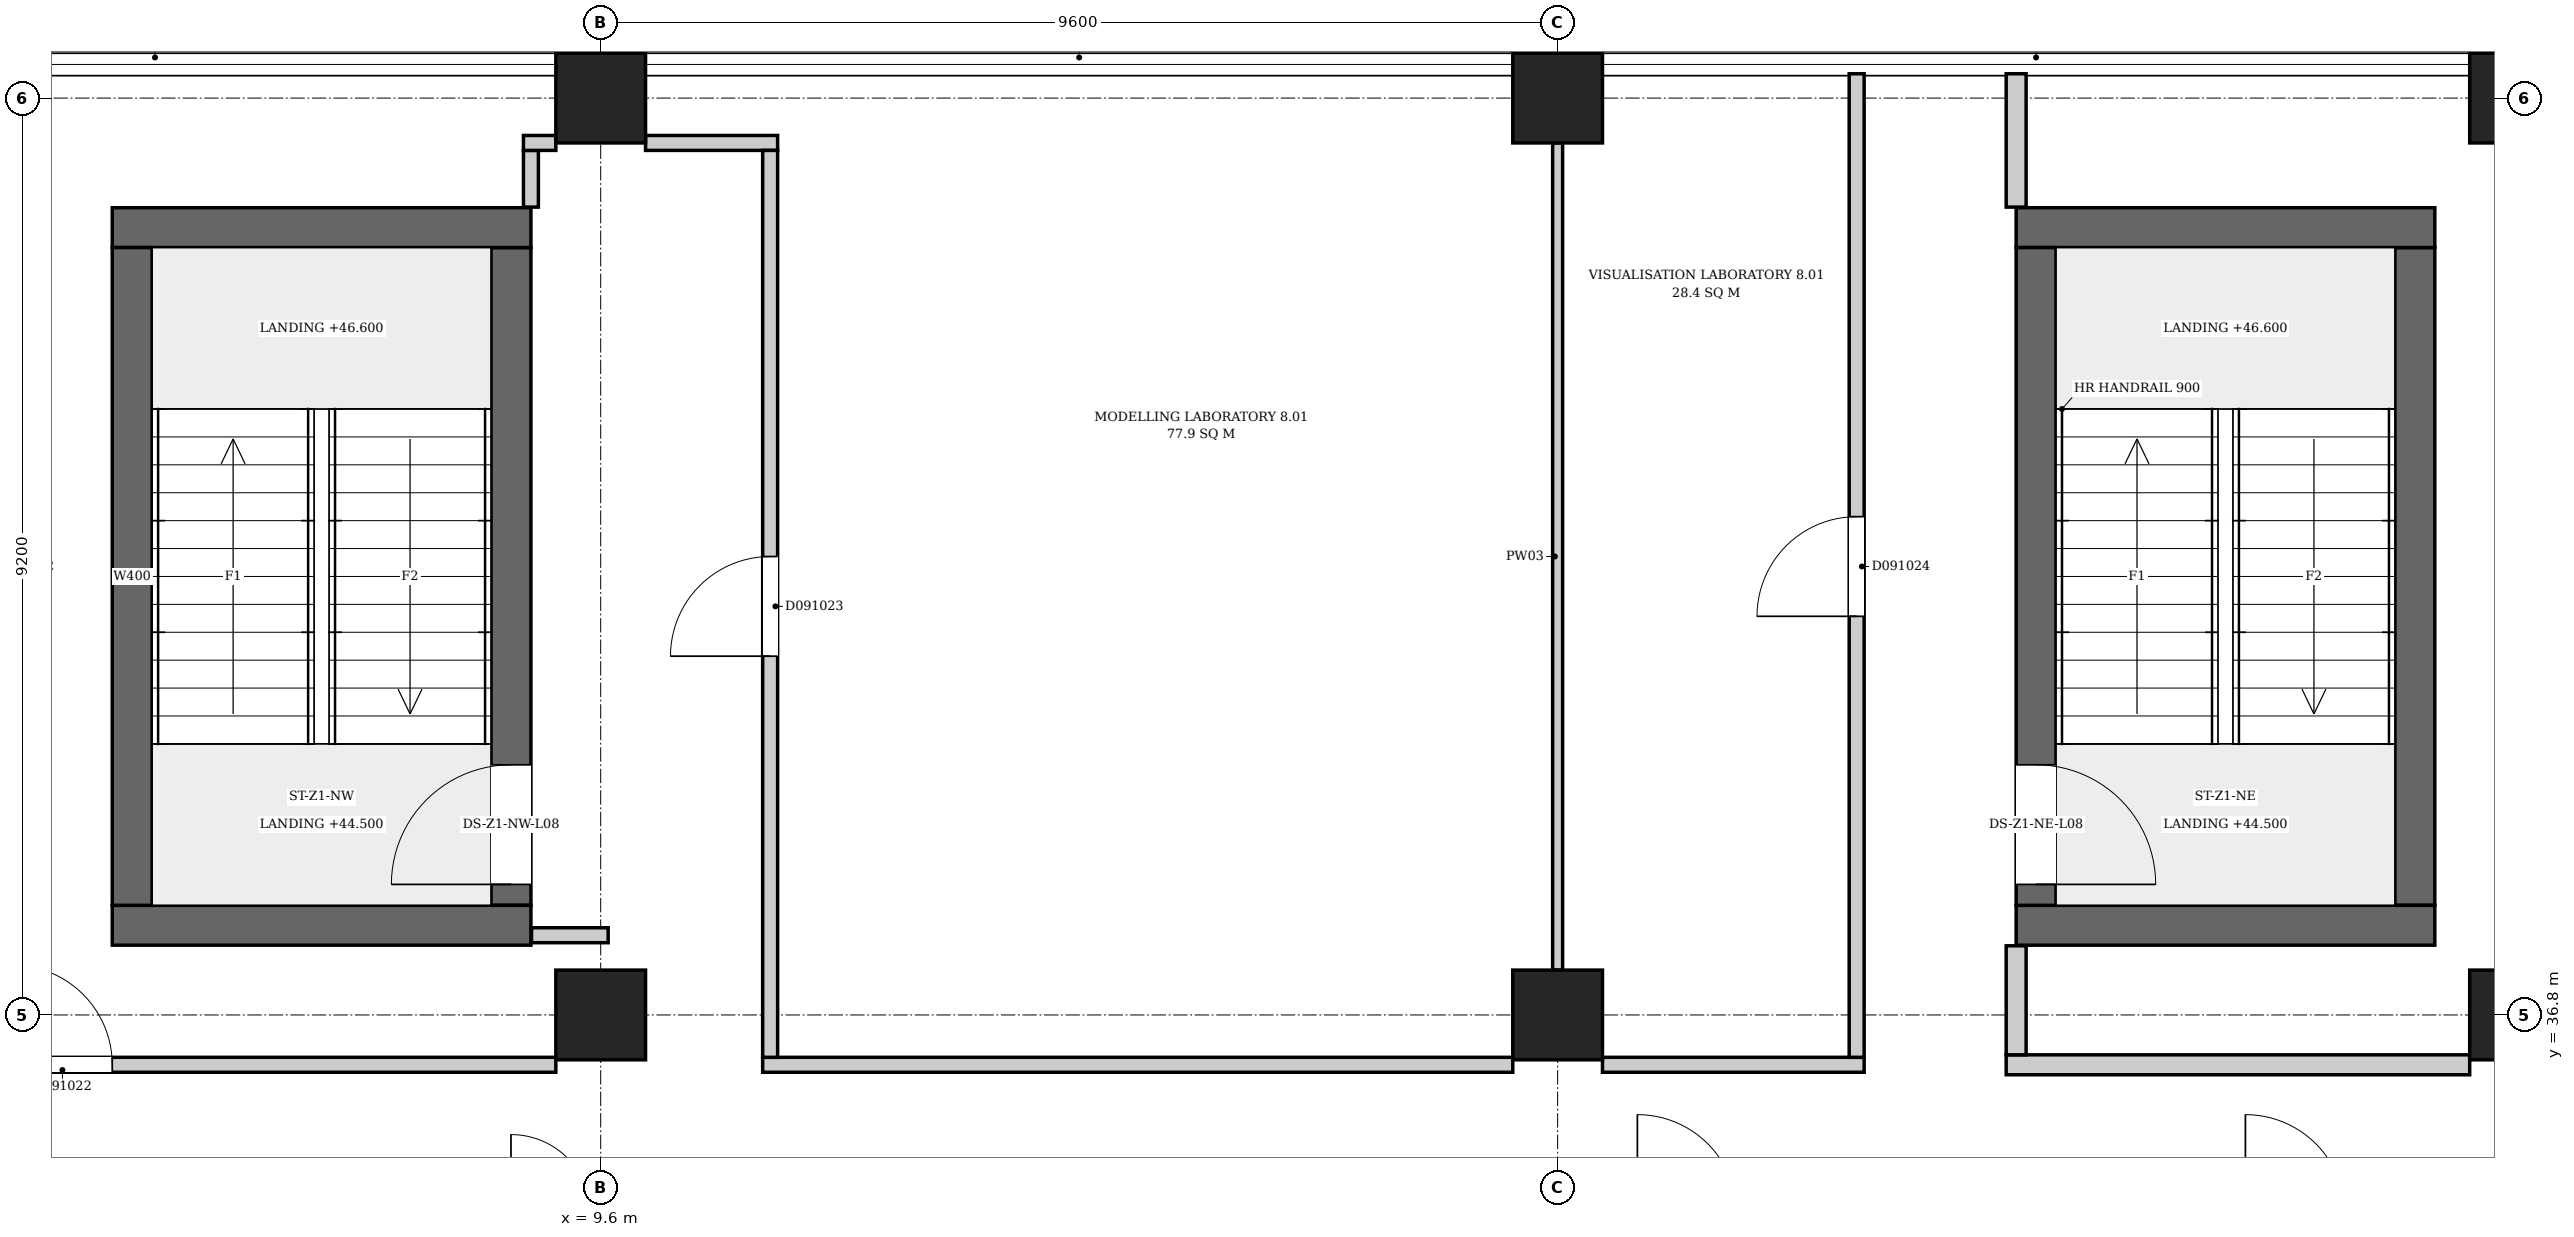
"""IFC4 building model, lengths in metres.
Left out: names, types, materials, properties, quantities, classifications, styles, units other than length and angle.
Written with IfcOpenShell. Run it as: python <this file> out.ifc"""

import sys

from ifc_helpers import new_model, si_unit, direction, frame, frame_2d, origin, origin_2d, place, context, subcontext, project, spatial, rectangle, extrude, element, fill, save


model = new_model("IFC4")
c1 = context("Model", 3, precision=1e-05, world=origin(), true_north=direction((0.0, 1.0)))
c2 = subcontext(c1, "Body", "Model", "MODEL_VIEW")
j1 = project(units=[si_unit("LENGTHUNIT", "METRE"), si_unit("PLANEANGLEUNIT", "RADIAN")], contexts=[c1])
p1 = place(None, origin())
s1 = spatial("IfcSite", under=j1, at=p1, CompositionType="ELEMENT")
p2 = place(p1, origin())
s2 = spatial("IfcBuilding", under=s1, at=p2, CompositionType="ELEMENT")
p3 = place(p2, frame((0.0, 0.0, 44.5)))
s3 = spatial("IfcBuildingStorey", under=s2, at=p3, CompositionType="ELEMENT", Elevation=44.5)
for number, where, z_axis, x_axis in (
    (1, (4.7, 37.7, 0.0), (0.0, 0.0, 1.0), (1.0, 0.0, 0.0)),
    (2, (4.7, 44.7, 0.0), (0.0, 0.0, 1.0), (1.0, 0.0, 0.0)),
):
    element("IfcWall", number, at=place(p3, frame(where, z_axis=z_axis, x_axis=x_axis)), inside=s3, PredefinedType="SHEAR", context=c2, shape_type="SweptSolid", body=[
        extrude(rectangle(XDim=4.2, YDim=0.4, at=frame_2d((2.1, 0.0))), origin(), (0.0, 0.0, 1.0), 4.2),
    ])
p4 = place(p3, frame((4.9, 37.9, 0.0), z_axis=(0.0, 0.0, 1.0), x_axis=(0.0, 1.0, 0.0)))
e3 = element("IfcWall", 3, at=p4, inside=s3, PredefinedType="SHEAR", context=c2, shape_type="SweptSolid", body=[
    extrude(rectangle(XDim=6.6, YDim=0.4, at=frame_2d((3.3, 0.0))), origin(), (0.0, 0.0, 1.0), 4.2),
])
p5 = place(p3, frame((8.7, 37.9, 0.0), z_axis=(0.0, 0.0, 1.0), x_axis=(0.0, 1.0, 0.0)))
e4 = element("IfcWall", 4, at=p5, inside=s3, PredefinedType="SHEAR", context=c2, shape_type="SweptSolid", body=[
    extrude(rectangle(XDim=6.6, YDim=0.4, at=frame_2d((3.3, 0.0))), origin(), (0.0, 0.0, 1.0), 4.2),
])
p6 = place(p5, frame((0.21, 0.0, 0.0)))
e5 = element("IfcOpeningElement", 5, at=p6, cuts=e4, PredefinedType="OPENING", context=c2, shape_type="SweptSolid", body=[
    extrude(rectangle(XDim=1.2, YDim=2.1, at=frame_2d((0.6, 1.05))), frame((0.0, 0.21, 0.0), z_axis=(0.0, -1.0, 0.0), x_axis=(1.0, 0.0, 0.0)), (0.0, 0.0, 1.0), 0.42),
])
for number, where, z_axis, x_axis in (
    (6, (23.8, 37.7, 0.0), (0.0, 0.0, 1.0), (1.0, 0.0, 0.0)),
    (7, (23.8, 44.7, 0.0), (0.0, 0.0, 1.0), (1.0, 0.0, 0.0)),
):
    element("IfcWall", number, at=place(p3, frame(where, z_axis=z_axis, x_axis=x_axis)), inside=s3, PredefinedType="SHEAR", context=c2, shape_type="SweptSolid", body=[
        extrude(rectangle(XDim=4.2, YDim=0.4, at=frame_2d((2.1, 0.0))), origin(), (0.0, 0.0, 1.0), 4.2),
    ])
p7 = place(p3, frame((24.0, 37.9, 0.0), z_axis=(0.0, 0.0, 1.0), x_axis=(0.0, 1.0, 0.0)))
e8 = element("IfcWall", 8, at=p7, inside=s3, PredefinedType="SHEAR", context=c2, shape_type="SweptSolid", body=[
    extrude(rectangle(XDim=6.6, YDim=0.4, at=frame_2d((3.3, 0.0))), origin(), (0.0, 0.0, 1.0), 4.2),
])
p8 = place(p7, frame((0.21, 0.0, 0.0)))
e9 = element("IfcOpeningElement", 9, at=p8, cuts=e8, PredefinedType="OPENING", context=c2, shape_type="SweptSolid", body=[
    extrude(rectangle(XDim=1.2, YDim=2.1, at=frame_2d((0.6, 1.05))), frame((0.0, 0.21, 0.0), z_axis=(0.0, -1.0, 0.0), x_axis=(1.0, 0.0, 0.0)), (0.0, 0.0, 1.0), 0.42),
])
p9 = place(p3, frame((27.8, 37.9, 0.0), z_axis=(0.0, 0.0, 1.0), x_axis=(0.0, 1.0, 0.0)))
e10 = element("IfcWall", 10, at=p9, inside=s3, PredefinedType="SHEAR", context=c2, shape_type="SweptSolid", body=[
    extrude(rectangle(XDim=6.6, YDim=0.4, at=frame_2d((3.3, 0.0))), origin(), (0.0, 0.0, 1.0), 4.2),
])
for number, where, z_axis, x_axis in (
    (11, (9.6, 36.8, 0.0), (0.0, 0.0, 1.0), (1.0, 0.0, 0.0)),
    (12, (19.2, 36.8, 0.0), (0.0, 0.0, 1.0), (1.0, 0.0, 0.0)),
    (13, (28.8, 36.8, 0.0), (0.0, 0.0, 1.0), (1.0, 0.0, 0.0)),
    (14, (9.6, 46.0, 0.0), (0.0, 0.0, 1.0), (1.0, 0.0, 0.0)),
    (15, (19.2, 46.0, 0.0), (0.0, 0.0, 1.0), (1.0, 0.0, 0.0)),
    (16, (28.8, 46.0, 0.0), (0.0, 0.0, 1.0), (1.0, 0.0, 0.0)),
):
    element("IfcColumn", number, at=place(p3, frame(where, z_axis=z_axis, x_axis=x_axis)), inside=s3, PredefinedType="COLUMN", context=c2, shape_type="SweptSolid", body=[
        extrude(rectangle(XDim=0.9, YDim=0.9, at=origin_2d()), origin(), (0.0, 0.0, 1.0), 4.2),
    ])
p10 = place(p3, frame((0.7, 36.3, 0.0), z_axis=(0.0, 0.0, 1.0), x_axis=(1.0, 0.0, 0.0)))
e17 = element("IfcWall", 17, at=p10, inside=s3, PredefinedType="PARTITIONING", context=c2, shape_type="SweptSolid", body=[
    extrude(rectangle(XDim=8.45, YDim=0.15, at=frame_2d((4.225, 0.0))), origin(), (0.0, 0.0, 1.0), 3.9),
])
p11 = place(p10, frame((3.0, 0.0, 0.0)))
e18 = element("IfcOpeningElement", 18, at=p11, cuts=e17, PredefinedType="OPENING", context=c2, shape_type="SweptSolid", body=[
    extrude(rectangle(XDim=1.0, YDim=2.1, at=frame_2d((0.5, 1.05))), frame((0.0, 0.085, 0.0), z_axis=(0.0, -1.0, 0.0), x_axis=(1.0, 0.0, 0.0)), (0.0, 0.0, 1.0), 0.17),
])
p12 = place(p3, frame((8.9, 44.906, 0.0), z_axis=(0.0, 0.0, 1.0), x_axis=(0.0, 1.0, 0.0)))
e19 = element("IfcWall", 19, at=p12, inside=s3, PredefinedType="PARTITIONING", context=c2, shape_type="SweptSolid", body=[
    extrude(rectangle(XDim=0.569, YDim=0.15, at=frame_2d((0.285, 0.0))), origin(), (0.0, 0.0, 1.0), 3.9),
])
p13 = place(p3, frame((8.825, 45.55, 0.0), z_axis=(0.0, 0.0, 1.0), x_axis=(1.0, 0.0, 0.0)))
e20 = element("IfcWall", 20, at=p13, inside=s3, PredefinedType="PARTITIONING", context=c2, shape_type="SweptSolid", body=[
    extrude(rectangle(XDim=0.325, YDim=0.15, at=frame_2d((0.163, 0.0))), origin(), (0.0, 0.0, 1.0), 3.9),
])
p14 = place(p3, frame((8.906, 37.6, 0.0), z_axis=(0.0, 0.0, 1.0), x_axis=(1.0, 0.0, 0.0)))
e21 = element("IfcWall", 21, at=p14, inside=s3, PredefinedType="PARTITIONING", context=c2, shape_type="SweptSolid", body=[
    extrude(rectangle(XDim=0.769, YDim=0.15, at=frame_2d((0.385, 0.0))), origin(), (0.0, 0.0, 1.0), 3.9),
])
p15 = place(p3, frame((10.05, 45.55, 0.0), z_axis=(0.0, 0.0, 1.0), x_axis=(1.0, 0.0, 0.0)))
e22 = element("IfcWall", 22, at=p15, inside=s3, PredefinedType="PARTITIONING", context=c2, shape_type="SweptSolid", body=[
    extrude(rectangle(XDim=1.325, YDim=0.15, at=frame_2d((0.663, 0.0))), origin(), (0.0, 0.0, 1.0), 3.9),
])
p16 = place(p3, frame((11.225, 36.3, 0.0), z_axis=(0.0, 0.0, 1.0), x_axis=(1.0, 0.0, 0.0)))
e23 = element("IfcWall", 23, at=p16, inside=s3, PredefinedType="PARTITIONING", context=c2, shape_type="SweptSolid", body=[
    extrude(rectangle(XDim=7.525, YDim=0.15, at=frame_2d((3.762, 0.0))), origin(), (0.0, 0.0, 1.0), 3.9),
])
p17 = place(p3, frame((11.3, 36.375, 0.0), z_axis=(0.0, 0.0, 1.0), x_axis=(0.0, 1.0, 0.0)))
e24 = element("IfcWall", 24, at=p17, inside=s3, PredefinedType="PARTITIONING", context=c2, shape_type="SweptSolid", body=[
    extrude(rectangle(XDim=9.1, YDim=0.15, at=frame_2d((4.55, 0.0))), origin(), (0.0, 0.0, 1.0), 3.9),
])
p18 = place(p17, frame((4.025, 0.0, 0.0)))
e25 = element("IfcOpeningElement", 25, at=p18, cuts=e24, PredefinedType="OPENING", context=c2, shape_type="SweptSolid", body=[
    extrude(rectangle(XDim=1.0, YDim=2.1, at=frame_2d((0.5, 1.05))), frame((0.0, 0.085, 0.0), z_axis=(0.0, -1.0, 0.0), x_axis=(1.0, 0.0, 0.0)), (0.0, 0.0, 1.0), 0.17),
])
p19 = place(p3, frame((19.2, 37.25, 0.0), z_axis=(0.0, 0.0, 1.0), x_axis=(0.0, 1.0, 0.0)))
e26 = element("IfcWall", 26, at=p19, inside=s3, PredefinedType="PARTITIONING", context=c2, shape_type="SweptSolid", body=[
    extrude(rectangle(XDim=8.3, YDim=0.1, at=frame_2d((4.15, 0.0))), origin(), (0.0, 0.0, 1.0), 3.9),
])
p20 = place(p3, frame((19.65, 36.3, 0.0), z_axis=(0.0, 0.0, 1.0), x_axis=(1.0, 0.0, 0.0)))
e27 = element("IfcWall", 27, at=p20, inside=s3, PredefinedType="PARTITIONING", context=c2, shape_type="SweptSolid", body=[
    extrude(rectangle(XDim=2.625, YDim=0.15, at=frame_2d((1.312, 0.0))), origin(), (0.0, 0.0, 1.0), 3.9),
])
p21 = place(p3, frame((22.2, 36.375, 0.0), z_axis=(0.0, 0.0, 1.0), x_axis=(0.0, 1.0, 0.0)))
e28 = element("IfcWall", 28, at=p21, inside=s3, PredefinedType="PARTITIONING", context=c2, shape_type="SweptSolid", body=[
    extrude(rectangle(XDim=9.869, YDim=0.15, at=frame_2d((4.935, 0.0))), origin(), (0.0, 0.0, 1.0), 3.9),
])
p22 = place(p21, frame((4.425, 0.0, 0.0)))
e29 = element("IfcOpeningElement", 29, at=p22, cuts=e28, PredefinedType="OPENING", context=c2, shape_type="SweptSolid", body=[
    extrude(rectangle(XDim=1.0, YDim=2.1, at=frame_2d((0.5, 1.05))), frame((0.0, 0.085, 0.0), z_axis=(0.0, -1.0, 0.0), x_axis=(1.0, 0.0, 0.0)), (0.0, 0.0, 1.0), 0.17),
])
p23 = place(p3, frame((23.7, 36.3, 0.0), z_axis=(0.0, 0.0, 1.0), x_axis=(1.0, 0.0, 0.0)))
e30 = element("IfcWall", 30, at=p23, inside=s3, PredefinedType="PARTITIONING", context=c2, shape_type="SweptSolid", body=[
    extrude(rectangle(XDim=4.65, YDim=0.2, at=frame_2d((2.325, 0.0))), origin(), (0.0, 0.0, 1.0), 3.9),
])
p24 = place(p3, frame((23.8, 36.4, 0.0), z_axis=(0.0, 0.0, 1.0), x_axis=(0.0, 1.0, 0.0)))
e31 = element("IfcWall", 31, at=p24, inside=s3, PredefinedType="PARTITIONING", context=c2, shape_type="SweptSolid", body=[
    extrude(rectangle(XDim=1.094, YDim=0.2, at=frame_2d((0.547, 0.0))), origin(), (0.0, 0.0, 1.0), 3.9),
])
p25 = place(p3, frame((23.8, 44.906, 0.0), z_axis=(0.0, 0.0, 1.0), x_axis=(0.0, 1.0, 0.0)))
e32 = element("IfcWall", 32, at=p25, inside=s3, PredefinedType="PARTITIONING", context=c2, shape_type="SweptSolid", body=[
    extrude(rectangle(XDim=1.338, YDim=0.2, at=frame_2d((0.669, 0.0))), origin(), (0.0, 0.0, 1.0), 3.9),
])
p26 = place(p6, origin())
e33 = element("IfcDoor", 33, at=p26, inside=s3, OperationType="SINGLE_SWING_RIGHT", PredefinedType="DOOR", context=c2, shape_type="SweptSolid", body=[
    extrude(rectangle(XDim=1.2, YDim=2.1, at=frame_2d((0.6, 1.05))), frame((0.0, 0.025, 0.0), z_axis=(0.0, -1.0, 0.0), x_axis=(1.0, 0.0, 0.0)), (0.0, 0.0, 1.0), 0.05),
])
fill(e5, e33)
p27 = place(p8, origin())
e34 = element("IfcDoor", 34, at=p27, inside=s3, OperationType="SINGLE_SWING_LEFT", PredefinedType="DOOR", context=c2, shape_type="SweptSolid", body=[
    extrude(rectangle(XDim=1.2, YDim=2.1, at=frame_2d((0.6, 1.05))), frame((0.0, 0.025, 0.0), z_axis=(0.0, -1.0, 0.0), x_axis=(1.0, 0.0, 0.0)), (0.0, 0.0, 1.0), 0.05),
])
fill(e9, e34)
p28 = place(p11, origin())
e35 = element("IfcDoor", 35, at=p28, inside=s3, OperationType="SINGLE_SWING_RIGHT", PredefinedType="DOOR", context=c2, shape_type="SweptSolid", body=[
    extrude(rectangle(XDim=1.0, YDim=2.1, at=frame_2d((0.5, 1.05))), frame((0.0, 0.025, 0.0), z_axis=(0.0, -1.0, 0.0), x_axis=(1.0, 0.0, 0.0)), (0.0, 0.0, 1.0), 0.05),
])
fill(e18, e35)
p29 = place(p18, origin())
e36 = element("IfcDoor", 36, at=p29, inside=s3, OperationType="SINGLE_SWING_LEFT", PredefinedType="DOOR", context=c2, shape_type="SweptSolid", body=[
    extrude(rectangle(XDim=1.0, YDim=2.1, at=frame_2d((0.5, 1.05))), frame((0.0, 0.025, 0.0), z_axis=(0.0, -1.0, 0.0), x_axis=(1.0, 0.0, 0.0)), (0.0, 0.0, 1.0), 0.05),
])
fill(e25, e36)
p30 = place(p22, origin())
e37 = element("IfcDoor", 37, at=p30, inside=s3, OperationType="SINGLE_SWING_RIGHT", PredefinedType="DOOR", context=c2, shape_type="SweptSolid", body=[
    extrude(rectangle(XDim=1.0, YDim=2.1, at=frame_2d((0.5, 1.05))), frame((0.0, 0.025, 0.0), z_axis=(0.0, -1.0, 0.0), x_axis=(1.0, 0.0, 0.0)), (0.0, 0.0, 1.0), 0.05),
])
fill(e29, e37)
save(model, sys.argv[1])
